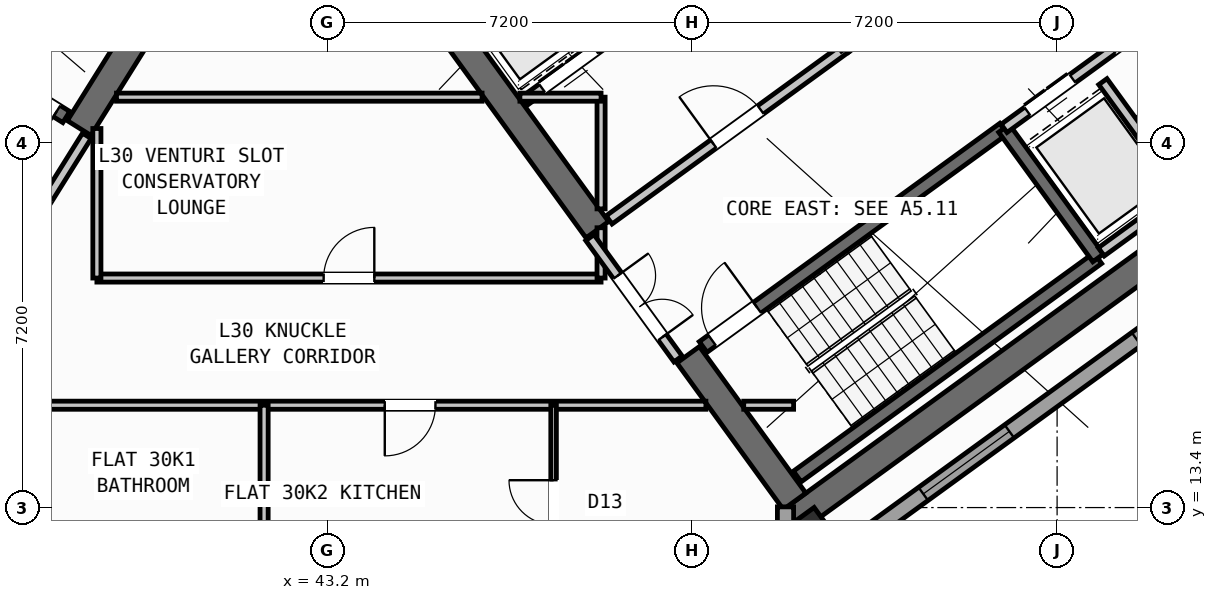
"""IFC4 building model, lengths in metres.
Left out: names, types, materials, properties, quantities, classifications, styles, units other than length and angle.
Written with IfcOpenShell. Run it as: python <this file> out.ifc"""

import sys

from ifc_helpers import new_model, si_unit, direction, frame, frame_2d, origin, origin_2d, place, context, subcontext, project, spatial, rectangle, hollow_rectangle, extrude, source, transform, mapped, element, fill, save


model = new_model("IFC4")
c1 = context("Model", 3, precision=1e-05, world=origin(), true_north=direction((0.0, 1.0)))
c2 = subcontext(c1, "Body", "Model", "MODEL_VIEW")
j1 = project(units=[si_unit("LENGTHUNIT", "METRE"), si_unit("PLANEANGLEUNIT", "RADIAN")], contexts=[c1])
p1 = place(None, origin())
s1 = spatial("IfcSite", under=j1, at=p1, CompositionType="ELEMENT")
p2 = place(p1, origin())
s2 = spatial("IfcBuilding", under=s1, at=p2, CompositionType="ELEMENT")
p3 = place(p2, frame((0.0, 0.0, 119.7)))
s3 = spatial("IfcBuildingStorey", under=s2, at=p3, CompositionType="ELEMENT", Elevation=119.7)
p4 = place(p3, frame((40.194, 23.922, 0.0), z_axis=(0.0, 0.0, 1.0), x_axis=(-0.529888438328, -0.848067357541, 0.0)))
e1 = element("IfcWall", 1, at=p4, inside=s3, PredefinedType="SHEAR", context=c2, shape_type="SweptSolid", body=[
    extrude(rectangle(XDim=3.575, YDim=0.55, at=frame_2d((1.788, 0.0))), origin(), (0.0, 0.0, 1.0), 3.35),
])
p5 = place(p3, frame((52.359, 13.14, 0.0), z_axis=(0.0, 0.0, 1.0), x_axis=(0.809014896919, 0.587788139183, 0.0)))
e2 = element("IfcWall", 2, at=p5, inside=s3, PredefinedType="SHEAR", context=c2, shape_type="SweptSolid", body=[
    extrude(rectangle(XDim=12.34, YDim=0.55, at=frame_2d((6.17, 0.0))), origin(), (0.0, 0.0, 1.0), 3.35),
])
p6 = place(p3, frame((52.42, 13.524, 0.0), z_axis=(0.0, 0.0, 1.0), x_axis=(-0.587802113096, 0.809004744015, 0.0)))
e3 = element("IfcWall", 3, at=p6, inside=s3, PredefinedType="SHEAR", context=c2, shape_type="SweptSolid", body=[
    extrude(rectangle(XDim=3.575, YDim=0.55, at=frame_2d((1.788, 0.0))), origin(), (0.0, 0.0, 1.0), 3.35),
])
p7 = place(p3, frame((48.526, 18.884, 0.0), z_axis=(0.0, 0.0, 1.0), x_axis=(-0.587764933797, 0.809031756236, 0.0)))
e4 = element("IfcWall", 4, at=p7, inside=s3, PredefinedType="SHEAR", context=c2, shape_type="SweptSolid", body=[
    extrude(rectangle(XDim=6.425, YDim=0.55, at=frame_2d((3.212, 0.0))), origin(), (0.0, 0.0, 1.0), 3.35),
])
m1 = source(origin(), c2, "Body", "SweptSolid", [
    extrude(hollow_rectangle(XDim=0.9, YDim=0.9, WallThickness=0.036, at=origin_2d()), origin(), (0.0, 0.0, 1.0), 3.6),
])
p8 = place(p3, frame((52.705, 12.773, 0.0), z_axis=(0.0, 0.0, 1.0), x_axis=(0.809016994375, 0.587785252292, 0.0)))
e5 = element("IfcColumn", 5, at=p8, inside=s3, PredefinedType="COLUMN", context=c2, shape_type="MappedRepresentation", body=[
    mapped(m1, transform((0.0, 0.0, 0.0), scale=1.0)),
])
p9 = place(p3, frame((67.454, 22.747, 0.0), z_axis=(0.0, 0.0, 1.0), x_axis=(-0.809021120468, -0.587779573171, 0.0)))
e6 = element("IfcWall", 6, at=p9, inside=s3, PredefinedType="STANDARD", context=c2, shape_type="SweptSolid", body=[
    extrude(rectangle(XDim=17.588, YDim=0.32, at=frame_2d((8.794, 0.0))), origin(), (0.0, 0.0, 1.0), 3.35),
])
p10 = place(p9, frame((1.624, 0.0, 0.0)))
e7 = element("IfcOpeningElement", 7, at=p10, cuts=e6, PredefinedType="OPENING", context=c2, shape_type="SweptSolid", body=[
    extrude(rectangle(XDim=1.05, YDim=2.15, at=frame_2d((0.525, 1.075))), frame((0.0, 0.17, 0.0), z_axis=(0.0, -1.0, 0.0), x_axis=(1.0, 0.0, 0.0)), (0.0, 0.0, 1.0), 0.34),
])
p11 = place(p9, frame((8.144, 0.0, 0.8)))
e8 = element("IfcOpeningElement", 8, at=p11, cuts=e6, PredefinedType="OPENING", context=c2, shape_type="SweptSolid", body=[
    extrude(rectangle(XDim=2.1, YDim=1.55, at=frame_2d((1.05, 0.775))), frame((0.0, 0.17, 0.0), z_axis=(0.0, -1.0, 0.0), x_axis=(1.0, 0.0, 0.0)), (0.0, 0.0, 1.0), 0.34),
])
p12 = place(p9, frame((13.344, 0.0, 0.8)))
e9 = element("IfcOpeningElement", 9, at=p12, cuts=e6, PredefinedType="OPENING", context=c2, shape_type="SweptSolid", body=[
    extrude(rectangle(XDim=2.1, YDim=1.55, at=frame_2d((1.05, 0.775))), frame((0.0, 0.17, 0.0), z_axis=(0.0, -1.0, 0.0), x_axis=(1.0, 0.0, 0.0)), (0.0, 0.0, 1.0), 0.34),
])
p13 = place(p3, frame((52.24, 13.414, 0.0), z_axis=(0.0, 0.0, 1.0), x_axis=(0.0, -1.0, 0.0)))
e10 = element("IfcWall", 10, at=p13, inside=s3, PredefinedType="STANDARD", context=c2, shape_type="SweptSolid", body=[
    extrude(rectangle(XDim=9.948, YDim=0.32, at=frame_2d((4.974, 0.0))), origin(), (0.0, 0.0, 1.0), 3.35),
])
p14 = place(p13, frame((2.46, 0.0, 0.8)))
e11 = element("IfcOpeningElement", 11, at=p14, cuts=e10, PredefinedType="OPENING", context=c2, shape_type="SweptSolid", body=[
    extrude(rectangle(XDim=2.1, YDim=1.55, at=frame_2d((1.05, 0.775))), frame((0.0, 0.17, 0.0), z_axis=(0.0, -1.0, 0.0), x_axis=(1.0, 0.0, 0.0)), (0.0, 0.0, 1.0), 0.34),
])
p15 = place(p13, frame((7.183, 0.0, 0.85)))
e12 = element("IfcOpeningElement", 12, at=p15, cuts=e10, PredefinedType="OPENING", context=c2, shape_type="SweptSolid", body=[
    extrude(rectangle(XDim=1.8, YDim=1.5, at=frame_2d((0.9, 0.75))), frame((0.0, 0.17, 0.0), z_axis=(0.0, -1.0, 0.0), x_axis=(1.0, 0.0, 0.0)), (0.0, 0.0, 1.0), 0.34),
])
p16 = place(p3, frame((38.046, 21.108, 0.0), z_axis=(0.0, 0.0, 1.0), x_axis=(-0.848054434086, 0.529909121291, 0.0)))
e13 = element("IfcWall", 13, at=p16, inside=s3, PredefinedType="SHEAR", context=c2, shape_type="SweptSolid", body=[
    extrude(rectangle(XDim=7.33, YDim=0.26, at=frame_2d((3.665, 0.0))), origin(), (0.0, 0.0, 1.0), 3.35),
])
p17 = place(p16, frame((0.22, 0.0, 0.0)))
e14 = element("IfcOpeningElement", 14, at=p17, cuts=e13, PredefinedType="OPENING", context=c2, shape_type="SweptSolid", body=[
    extrude(rectangle(XDim=1.1, YDim=2.1, at=frame_2d((0.55, 1.05))), frame((0.0, 0.14, 0.0), z_axis=(0.0, -1.0, 0.0), x_axis=(1.0, 0.0, 0.0)), (0.0, 0.0, 1.0), 0.28),
])
p18 = place(p3, frame((52.472, 14.013, 0.0), z_axis=(0.0, 0.0, 1.0), x_axis=(0.809028366311, 0.587769599847, 0.0)))
e15 = element("IfcWall", 15, at=p18, inside=s3, PredefinedType="SHEAR", context=c2, shape_type="SweptSolid", body=[
    extrude(rectangle(XDim=7.33, YDim=0.26, at=frame_2d((3.665, 0.0))), origin(), (0.0, 0.0, 1.0), 3.35),
])
p19 = place(p3, frame((50.615, 16.57, 0.0), z_axis=(0.0, 0.0, 1.0), x_axis=(0.809028366311, 0.587769599847, 0.0)))
e16 = element("IfcWall", 16, at=p19, inside=s3, PredefinedType="SHEAR", context=c2, shape_type="SweptSolid", body=[
    extrude(rectangle(XDim=7.33, YDim=0.26, at=frame_2d((3.665, 0.0))), origin(), (0.0, 0.0, 1.0), 3.35),
])
p20 = place(p19, frame((0.22, 0.0, 0.0)))
e17 = element("IfcOpeningElement", 17, at=p20, cuts=e16, PredefinedType="OPENING", context=c2, shape_type="SweptSolid", body=[
    extrude(rectangle(XDim=1.1, YDim=2.1, at=frame_2d((0.55, 1.05))), frame((0.0, 0.14, 0.0), z_axis=(0.0, -1.0, 0.0), x_axis=(1.0, 0.0, 0.0)), (0.0, 0.0, 1.0), 0.28),
])
p21 = place(p3, frame((58.41, 18.327, 0.0), z_axis=(0.0, 0.0, 1.0), x_axis=(-0.58776738483, 0.809029975545, 0.0)))
e18 = element("IfcWall", 18, at=p21, inside=s3, PredefinedType="SHEAR", context=c2, shape_type="SweptSolid", body=[
    extrude(rectangle(XDim=3.16, YDim=0.26, at=frame_2d((1.58, 0.0))), origin(), (0.0, 0.0, 1.0), 3.35),
])
p22 = place(p3, frame((47.065, 21.407, 0.0), z_axis=(0.0, 0.0, 1.0), x_axis=(0.809032984992, 0.587763242466, 0.0)))
e19 = element("IfcWall", 19, at=p22, inside=s3, PredefinedType="STANDARD", context=c2, shape_type="SweptSolid", body=[
    extrude(rectangle(XDim=3.448, YDim=0.2, at=frame_2d((1.724, 0.0))), origin(), (0.0, 0.0, 1.0), 3.34),
])
p23 = place(p22, frame((0.458, 0.0, 0.0)))
e20 = element("IfcOpeningElement", 20, at=p23, cuts=e19, PredefinedType="OPENING", context=c2, shape_type="SweptSolid", body=[
    extrude(rectangle(XDim=1.3, YDim=2.2, at=frame_2d((0.65, 1.1))), frame((0.0, 0.11, 0.0), z_axis=(0.0, -1.0, 0.0), x_axis=(1.0, 0.0, 0.0)), (0.0, 0.0, 1.0), 0.22),
])
p24 = place(p3, frame((48.758, 19.077, 0.0), z_axis=(0.0, 0.0, 1.0), x_axis=(0.809005065155, 0.587801671104, 0.0)))
e21 = element("IfcWall", 21, at=p24, inside=s3, PredefinedType="STANDARD", context=c2, shape_type="SweptSolid", body=[
    extrude(rectangle(XDim=5.768, YDim=0.2, at=frame_2d((2.884, 0.0))), origin(), (0.0, 0.0, 1.0), 3.34),
])
p25 = place(p24, frame((2.548, 0.0, 0.0)))
e22 = element("IfcOpeningElement", 22, at=p25, cuts=e21, PredefinedType="OPENING", context=c2, shape_type="SweptSolid", body=[
    extrude(rectangle(XDim=1.15, YDim=2.1, at=frame_2d((0.575, 1.05))), frame((0.0, 0.11, 0.0), z_axis=(0.0, -1.0, 0.0), x_axis=(1.0, 0.0, 0.0)), (0.0, 0.0, 1.0), 0.22),
])
p26 = place(p3, frame((56.553, 20.884, 0.0), z_axis=(0.0, 0.0, 1.0), x_axis=(0.809023564264, 0.58777620951, 0.0)))
e23 = element("IfcWall", 23, at=p26, inside=s3, PredefinedType="STANDARD", context=c2, shape_type="SweptSolid", body=[
    extrude(rectangle(XDim=3.818, YDim=0.2, at=frame_2d((1.909, 0.0))), origin(), (0.0, 0.0, 1.0), 3.34),
])
p27 = place(p26, frame((0.57, 0.0, 0.0)))
e24 = element("IfcOpeningElement", 24, at=p27, cuts=e23, PredefinedType="OPENING", context=c2, shape_type="SweptSolid", body=[
    extrude(rectangle(XDim=1.1, YDim=2.15, at=frame_2d((0.55, 1.075))), frame((0.0, 0.11, 0.0), z_axis=(0.0, -1.0, 0.0), x_axis=(1.0, 0.0, 0.0)), (0.0, 0.0, 1.0), 0.22),
])
p28 = place(p26, frame((2.65, 0.0, 0.0)))
e25 = element("IfcOpeningElement", 25, at=p28, cuts=e23, PredefinedType="OPENING", context=c2, shape_type="SweptSolid", body=[
    extrude(rectangle(XDim=0.86, YDim=2.05, at=frame_2d((0.43, 1.025))), frame((0.0, 0.11, 0.0), z_axis=(0.0, -1.0, 0.0), x_axis=(1.0, 0.0, 0.0)), (0.0, 0.0, 1.0), 0.22),
])
p29 = place(p3, frame((60.067, 19.655, 0.0), z_axis=(0.0, 0.0, 1.0), x_axis=(-0.587800520745, 0.809005900975, 0.0)))
e26 = element("IfcWall", 26, at=p29, inside=s3, PredefinedType="STANDARD", context=c2, shape_type="SweptSolid", body=[
    extrude(rectangle(XDim=2.66, YDim=0.2, at=frame_2d((1.33, 0.0))), origin(), (0.0, 0.0, 1.0), 3.34),
])
p30 = place(p3, frame((58.472, 18.447, 0.0), z_axis=(0.0, 0.0, 1.0), x_axis=(0.809018631237, 0.587782999339, 0.0)))
e27 = element("IfcWall", 27, at=p30, inside=s3, PredefinedType="STANDARD", context=c2, shape_type="SweptSolid", body=[
    extrude(rectangle(XDim=3.698, YDim=0.2, at=frame_2d((1.849, 0.0))), origin(), (0.0, 0.0, 1.0), 3.34),
])
p31 = place(p3, frame((53.425, 22.468, 0.0), z_axis=(0.0, 0.0, 1.0), x_axis=(0.809024377198, 0.587775090574, 0.0)))
e28 = element("IfcWall", 28, at=p31, inside=s3, PredefinedType="STANDARD", context=c2, shape_type="SweptSolid", body=[
    extrude(rectangle(XDim=5.418, YDim=0.2, at=frame_2d((2.709, 0.0))), origin(), (0.0, 0.0, 1.0), 3.34),
])
p32 = place(p31, frame((4.28, 0.0, 0.0)))
e29 = element("IfcOpeningElement", 29, at=p32, cuts=e28, PredefinedType="OPENING", context=c2, shape_type="SweptSolid", body=[
    extrude(rectangle(XDim=0.86, YDim=2.05, at=frame_2d((0.43, 1.025))), frame((0.0, 0.11, 0.0), z_axis=(0.0, -1.0, 0.0), x_axis=(1.0, 0.0, 0.0)), (0.0, 0.0, 1.0), 0.22),
])
p33 = place(p31, frame((1.45, 0.0, 0.0)))
e30 = element("IfcOpeningElement", 30, at=p33, cuts=e28, PredefinedType="OPENING", context=c2, shape_type="SweptSolid", body=[
    extrude(rectangle(XDim=0.86, YDim=2.05, at=frame_2d((0.43, 1.025))), frame((0.0, 0.11, 0.0), z_axis=(0.0, -1.0, 0.0), x_axis=(1.0, 0.0, 0.0)), (0.0, 0.0, 1.0), 0.22),
])
p34 = place(p3, frame((38.451, 20.737, 0.0), z_axis=(0.0, 0.0, 1.0), x_axis=(-0.529924799939, -0.848044637038, 0.0)))
e31 = element("IfcWall", 31, at=p34, inside=s3, PredefinedType="STANDARD", context=c2, shape_type="SweptSolid", body=[
    extrude(rectangle(XDim=2.96, YDim=0.2, at=frame_2d((1.48, 0.0))), origin(), (0.0, 0.0, 1.0), 3.34),
])
p35 = place(p34, frame((1.46, 0.0, 0.0)))
e32 = element("IfcOpeningElement", 32, at=p35, cuts=e31, PredefinedType="OPENING", context=c2, shape_type="SweptSolid", body=[
    extrude(rectangle(XDim=0.86, YDim=2.05, at=frame_2d((0.43, 1.025))), frame((0.0, 0.11, 0.0), z_axis=(0.0, -1.0, 0.0), x_axis=(1.0, 0.0, 0.0)), (0.0, 0.0, 1.0), 0.22),
])
p36 = place(p3, frame((35.237, 15.42, 0.0), z_axis=(0.0, 0.0, 1.0), x_axis=(1.0, 0.0, 0.0)))
e33 = element("IfcWall", 33, at=p36, inside=s3, PredefinedType="PARTITIONING", context=c2, shape_type="SweptSolid", body=[
    extrude(rectangle(XDim=15.432, YDim=0.16, at=frame_2d((7.716, 0.0))), origin(), (0.0, 0.0, 1.0), 3.34),
])
p37 = place(p36, frame((0.674, 0.0, 0.0)))
e34 = element("IfcOpeningElement", 34, at=p37, cuts=e33, PredefinedType="OPENING", context=c2, shape_type="SweptSolid", body=[
    extrude(rectangle(XDim=1.0, YDim=2.1, at=frame_2d((0.5, 1.05))), frame((0.0, 0.09, 0.0), z_axis=(0.0, -1.0, 0.0), x_axis=(1.0, 0.0, 0.0)), (0.0, 0.0, 1.0), 0.18),
])
p38 = place(p36, frame((9.094, 0.0, 0.0)))
e35 = element("IfcOpeningElement", 35, at=p38, cuts=e33, PredefinedType="OPENING", context=c2, shape_type="SweptSolid", body=[
    extrude(rectangle(XDim=1.0, YDim=2.1, at=frame_2d((0.5, 1.05))), frame((0.0, 0.09, 0.0), z_axis=(0.0, -1.0, 0.0), x_axis=(1.0, 0.0, 0.0)), (0.0, 0.0, 1.0), 0.18),
])
p39 = place(p3, frame((51.416, 15.42, 0.0), z_axis=(0.0, 0.0, 1.0), x_axis=(1.0, 0.0, 0.0)))
e36 = element("IfcWall", 36, at=p39, inside=s3, PredefinedType="PARTITIONING", context=c2, shape_type="SweptSolid", body=[
    extrude(rectangle(XDim=0.984, YDim=0.16, at=frame_2d((0.492, 0.0))), origin(), (0.0, 0.0, 1.0), 3.34),
])
p40 = place(p3, frame((38.65, 17.93, 0.0), z_axis=(0.0, 0.0, 1.0), x_axis=(1.0, 0.0, 0.0)))
e37 = element("IfcWall", 37, at=p40, inside=s3, PredefinedType="PARTITIONING", context=c2, shape_type="SweptSolid", body=[
    extrude(rectangle(XDim=9.95, YDim=0.16, at=frame_2d((4.975, 0.0))), origin(), (0.0, 0.0, 1.0), 3.34),
])
p41 = place(p40, frame((4.475, 0.0, 0.0)))
e38 = element("IfcOpeningElement", 38, at=p41, cuts=e37, PredefinedType="OPENING", context=c2, shape_type="SweptSolid", body=[
    extrude(rectangle(XDim=1.0, YDim=2.1, at=frame_2d((0.5, 1.05))), frame((0.0, 0.09, 0.0), z_axis=(0.0, -1.0, 0.0), x_axis=(1.0, 0.0, 0.0)), (0.0, 0.0, 1.0), 0.18),
])
p42 = place(p3, frame((38.65, 17.93, 0.0), z_axis=(0.0, 0.0, 1.0), x_axis=(0.0, 1.0, 0.0)))
e39 = element("IfcWall", 39, at=p42, inside=s3, PredefinedType="PARTITIONING", context=c2, shape_type="SweptSolid", body=[
    extrude(rectangle(XDim=2.951, YDim=0.16, at=frame_2d((1.476, 0.0))), origin(), (0.0, 0.0, 1.0), 3.34),
])
p43 = place(p3, frame((48.6, 17.93, 0.0), z_axis=(0.0, 0.0, 1.0), x_axis=(0.0, 1.0, 0.0)))
e40 = element("IfcWall", 40, at=p43, inside=s3, PredefinedType="PARTITIONING", context=c2, shape_type="SweptSolid", body=[
    extrude(rectangle(XDim=0.993, YDim=0.16, at=frame_2d((0.496, 0.0))), origin(), (0.0, 0.0, 1.0), 3.34),
])
p44 = place(p3, frame((48.6, 19.295, 0.0), z_axis=(0.0, 0.0, 1.0), x_axis=(0.0, 1.0, 0.0)))
e41 = element("IfcWall", 41, at=p44, inside=s3, PredefinedType="PARTITIONING", context=c2, shape_type="SweptSolid", body=[
    extrude(rectangle(XDim=2.205, YDim=0.16, at=frame_2d((1.103, 0.0))), origin(), (0.0, 0.0, 1.0), 3.34),
])
p45 = place(p3, frame((39.037, 21.5, 0.0), z_axis=(0.0, 0.0, 1.0), x_axis=(1.0, 0.0, 0.0)))
e42 = element("IfcWall", 42, at=p45, inside=s3, PredefinedType="PARTITIONING", context=c2, shape_type="SweptSolid", body=[
    extrude(rectangle(XDim=7.215, YDim=0.16, at=frame_2d((3.607, 0.0))), origin(), (0.0, 0.0, 1.0), 3.34),
])
p46 = place(p3, frame((46.998, 21.5, 0.0), z_axis=(0.0, 0.0, 1.0), x_axis=(1.0, 0.0, 0.0)))
e43 = element("IfcWall", 43, at=p46, inside=s3, PredefinedType="PARTITIONING", context=c2, shape_type="SweptSolid", body=[
    extrude(rectangle(XDim=1.602, YDim=0.16, at=frame_2d((0.801, 0.0))), origin(), (0.0, 0.0, 1.0), 3.34),
])
p47 = place(p3, frame((50.119, 16.333, 0.0), z_axis=(0.0, 0.0, 1.0), x_axis=(-0.587749856981, 0.809042709391, 0.0)))
e44 = element("IfcWall", 44, at=p47, inside=s3, PredefinedType="STANDARD", context=c2, shape_type="SweptSolid", body=[
    extrude(rectangle(XDim=2.96, YDim=0.2, at=frame_2d((1.48, 0.0))), origin(), (0.0, 0.0, 1.0), 3.34),
])
p48 = place(p47, frame((0.53, 0.0, 0.0)))
e45 = element("IfcOpeningElement", 45, at=p48, cuts=e44, PredefinedType="OPENING", context=c2, shape_type="SweptSolid", body=[
    extrude(rectangle(XDim=1.5, YDim=2.15, at=frame_2d((0.75, 1.075))), frame((0.0, 0.11, 0.0), z_axis=(0.0, -1.0, 0.0), x_axis=(1.0, 0.0, 0.0)), (0.0, 0.0, 1.0), 0.22),
])
p49 = place(p3, frame((41.95, 1.96, 0.0), z_axis=(0.0, 0.0, 1.0), x_axis=(0.0, 1.0, 0.0)))
e46 = element("IfcWall", 46, at=p49, inside=s3, PredefinedType="PARTITIONING", context=c2, shape_type="SweptSolid", body=[
    extrude(rectangle(XDim=13.46, YDim=0.16, at=frame_2d((6.73, 0.0))), origin(), (0.0, 0.0, 1.0), 3.34),
])
p50 = place(p3, frame((47.663, 1.96, 0.0), z_axis=(0.0, 0.0, 1.0), x_axis=(0.0, 1.0, 0.0)))
e47 = element("IfcWall", 47, at=p50, inside=s3, PredefinedType="PARTITIONING", context=c2, shape_type="SweptSolid", body=[
    extrude(rectangle(XDim=13.46, YDim=0.11, at=frame_2d((6.73, 0.0))), origin(), (0.0, 0.0, 1.0), 3.34),
])
p51 = place(p50, frame((6.3, 0.0, 0.0)))
e48 = element("IfcOpeningElement", 48, at=p51, cuts=e47, PredefinedType="OPENING", context=c2, shape_type="SweptSolid", body=[
    extrude(rectangle(XDim=0.92, YDim=2.08, at=frame_2d((0.46, 1.04))), frame((0.0, 0.065, 0.0), z_axis=(0.0, -1.0, 0.0), x_axis=(1.0, 0.0, 0.0)), (0.0, 0.0, 1.0), 0.13),
])
p52 = place(p50, frame((11.1, 0.0, 0.0)))
e49 = element("IfcOpeningElement", 49, at=p52, cuts=e47, PredefinedType="OPENING", context=c2, shape_type="SweptSolid", body=[
    extrude(rectangle(XDim=0.88, YDim=2.08, at=frame_2d((0.44, 1.04))), frame((0.0, 0.065, 0.0), z_axis=(0.0, -1.0, 0.0), x_axis=(1.0, 0.0, 0.0)), (0.0, 0.0, 1.0), 0.13),
])
m2 = source(origin(), c2, "Body", "SweptSolid", [
    extrude(rectangle(XDim=2.1, YDim=1.55, at=frame_2d((1.05, 0.775))), frame((0.0, 0.03, 0.0), z_axis=(0.0, -1.0, 0.0), x_axis=(1.0, 0.0, 0.0)), (0.0, 0.0, 1.0), 0.06),
])
p53 = place(p11, origin())
e50 = element("IfcWindow", 50, at=p53, inside=s3, PartitioningType="SINGLE_PANEL", PredefinedType="WINDOW", context=c2, shape_type="MappedRepresentation", body=[
    mapped(m2, transform((0.0, 0.0, 0.0), scale=1.0)),
])
fill(e8, e50)
p54 = place(p12, origin())
e51 = element("IfcWindow", 51, at=p54, inside=s3, PartitioningType="SINGLE_PANEL", PredefinedType="WINDOW", context=c2, shape_type="MappedRepresentation", body=[
    mapped(m2, transform((0.0, 0.0, 0.0), scale=1.0)),
])
fill(e9, e51)
m3 = source(origin(), c2, "Body", "SweptSolid", [
    extrude(rectangle(XDim=1.1, YDim=2.1, at=frame_2d((0.55, 1.05))), frame((0.0, 0.025, 0.0), z_axis=(0.0, -1.0, 0.0), x_axis=(1.0, 0.0, 0.0)), (0.0, 0.0, 1.0), 0.05),
])
p55 = place(p17, origin())
e52 = element("IfcDoor", 52, at=p55, inside=s3, OperationType="SINGLE_SWING_LEFT", PredefinedType="DOOR", context=c2, shape_type="MappedRepresentation", body=[
    mapped(m3, transform((0.0, 0.0, 0.0), scale=1.0)),
])
fill(e14, e52)
p56 = place(p20, origin())
e53 = element("IfcDoor", 53, at=p56, inside=s3, OperationType="SINGLE_SWING_RIGHT", PredefinedType="DOOR", context=c2, shape_type="MappedRepresentation", body=[
    mapped(m3, transform((0.0, 0.0, 0.0), scale=1.0)),
])
fill(e17, e53)
m4 = source(origin(), c2, "Body", "SweptSolid", [
    extrude(rectangle(XDim=1.15, YDim=2.1, at=frame_2d((0.575, 1.05))), frame((0.0, 0.025, 0.0), z_axis=(0.0, -1.0, 0.0), x_axis=(1.0, 0.0, 0.0)), (0.0, 0.0, 1.0), 0.05),
])
p57 = place(p25, origin())
e54 = element("IfcDoor", 54, at=p57, inside=s3, OperationType="SINGLE_SWING_LEFT", PredefinedType="DOOR", context=c2, shape_type="MappedRepresentation", body=[
    mapped(m4, transform((0.0, 0.0, 0.0), scale=1.0)),
])
fill(e22, e54)
m5 = source(origin(), c2, "Body", "SweptSolid", [
    extrude(rectangle(XDim=1.3, YDim=2.2, at=frame_2d((0.65, 1.1))), frame((0.0, 0.025, 0.0), z_axis=(0.0, -1.0, 0.0), x_axis=(1.0, 0.0, 0.0)), (0.0, 0.0, 1.0), 0.05),
])
p58 = place(p23, origin())
e55 = element("IfcDoor", 55, at=p58, inside=s3, OperationType="DOUBLE_DOOR_SLIDING", PredefinedType="DOOR", context=c2, shape_type="MappedRepresentation", body=[
    mapped(m5, transform((0.0, 0.0, 0.0), scale=1.0)),
])
fill(e20, e55)
m6 = source(origin(), c2, "Body", "SweptSolid", [
    extrude(rectangle(XDim=1.1, YDim=2.15, at=frame_2d((0.55, 1.075))), frame((0.0, 0.025, 0.0), z_axis=(0.0, -1.0, 0.0), x_axis=(1.0, 0.0, 0.0)), (0.0, 0.0, 1.0), 0.05),
])
p59 = place(p27, origin())
e56 = element("IfcDoor", 56, at=p59, inside=s3, OperationType="DOUBLE_DOOR_SLIDING", PredefinedType="DOOR", context=c2, shape_type="MappedRepresentation", body=[
    mapped(m6, transform((0.0, 0.0, 0.0), scale=1.0)),
])
fill(e24, e56)
m7 = source(origin(), c2, "Body", "SweptSolid", [
    extrude(rectangle(XDim=1.0, YDim=2.1, at=frame_2d((0.5, 1.05))), frame((0.0, 0.025, 0.0), z_axis=(0.0, -1.0, 0.0), x_axis=(1.0, 0.0, 0.0)), (0.0, 0.0, 1.0), 0.05),
])
p60 = place(p41, origin())
e57 = element("IfcDoor", 57, at=p60, inside=s3, OperationType="SINGLE_SWING_RIGHT", PredefinedType="DOOR", context=c2, shape_type="MappedRepresentation", body=[
    mapped(m7, transform((0.0, 0.0, 0.0), scale=1.0)),
])
fill(e38, e57)
m8 = source(origin(), c2, "Body", "SweptSolid", [
    extrude(rectangle(XDim=1.5, YDim=2.15, at=frame_2d((0.75, 1.075))), frame((0.0, 0.025, 0.0), z_axis=(0.0, -1.0, 0.0), x_axis=(1.0, 0.0, 0.0)), (0.0, 0.0, 1.0), 0.05),
])
p61 = place(p48, frame((1.5, 0.0, 0.0), z_axis=(0.0, 0.0, 1.0), x_axis=(-1.0, 0.0, 0.0)))
e58 = element("IfcDoor", 58, at=p61, inside=s3, OperationType="DOUBLE_DOOR_SINGLE_SWING", PredefinedType="DOOR", context=c2, shape_type="MappedRepresentation", body=[
    mapped(m8, transform((0.0, 0.0, 0.0), scale=1.0)),
])
fill(e45, e58)
p62 = place(p38, frame((1.0, 0.0, 0.0), z_axis=(0.0, 0.0, 1.0), x_axis=(-1.0, 0.0, 0.0)))
e59 = element("IfcDoor", 59, at=p62, inside=s3, OperationType="SINGLE_SWING_RIGHT", PredefinedType="DOOR", context=c2, shape_type="MappedRepresentation", body=[
    mapped(m7, transform((0.0, 0.0, 0.0), scale=1.0)),
])
fill(e35, e59)
m9 = source(origin(), c2, "Body", "SweptSolid", [
    extrude(rectangle(XDim=0.88, YDim=2.08, at=frame_2d((0.44, 1.04))), frame((0.0, 0.025, 0.0), z_axis=(0.0, -1.0, 0.0), x_axis=(1.0, 0.0, 0.0)), (0.0, 0.0, 1.0), 0.05),
])
p63 = place(p52, origin())
e60 = element("IfcDoor", 60, at=p63, inside=s3, OperationType="SINGLE_SWING_RIGHT", PredefinedType="DOOR", context=c2, shape_type="MappedRepresentation", body=[
    mapped(m9, transform((0.0, 0.0, 0.0), scale=1.0)),
])
fill(e49, e60)
save(model, sys.argv[1])
